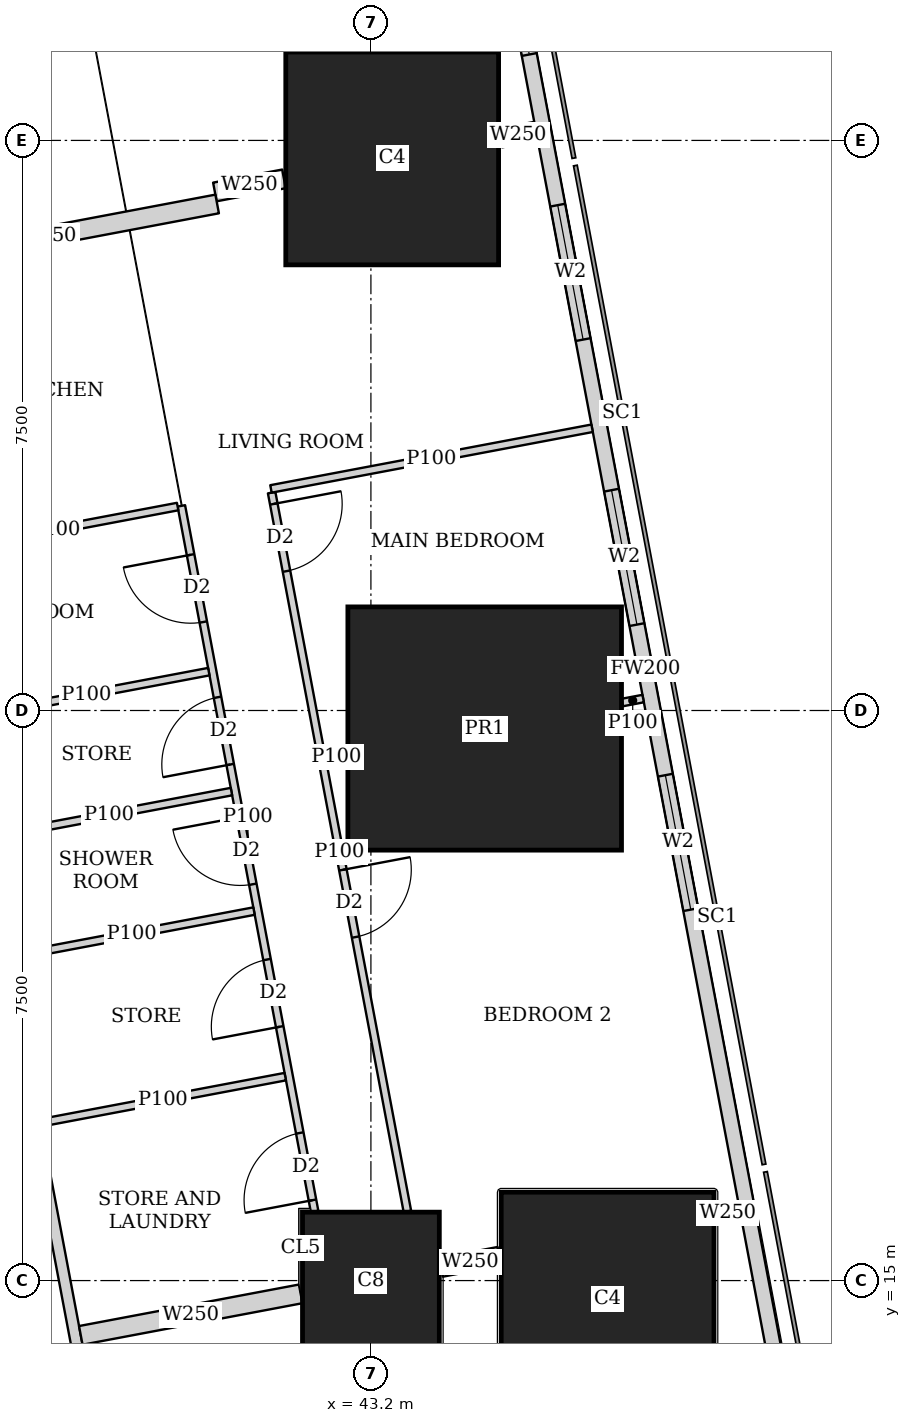
"""IFC4 building model, lengths in metres.
Left out: names, types, materials, properties, quantities, classifications, styles, units other than length and angle.
Written with IfcOpenShell. Run it as: python <this file> out.ifc"""

import sys

from ifc_helpers import new_model, si_unit, direction, frame, frame_2d, origin, origin_2d, place, context, subcontext, project, spatial, rectangle, extrude, element, fill, save


model = new_model("IFC4")
c1 = context("Model", 3, precision=1e-05, world=origin(), true_north=direction((0.0, 1.0)))
c2 = subcontext(c1, "Body", "Model", "MODEL_VIEW")
j1 = project(units=[si_unit("LENGTHUNIT", "METRE"), si_unit("PLANEANGLEUNIT", "RADIAN")], contexts=[c1])
p1 = place(None, origin())
s1 = spatial("IfcSite", under=j1, at=p1, CompositionType="ELEMENT")
p2 = place(p1, origin())
s2 = spatial("IfcBuilding", under=s1, at=p2, CompositionType="ELEMENT")
p3 = place(p2, frame((0.0, 0.0, 31.25)))
s3 = spatial("IfcBuildingStorey", under=s2, at=p3, CompositionType="ELEMENT", Elevation=31.25)
p4 = place(p3, frame((43.2, 15.0, 0.0), z_axis=(0.0, 0.0, 1.0), x_axis=(1.0, 0.0, 0.0)))
e1 = element("IfcColumn", 1, at=p4, inside=s3, PredefinedType="COLUMN", context=c2, shape_type="SweptSolid", body=[
    extrude(rectangle(XDim=1.8, YDim=1.8, at=origin_2d()), origin(), (0.0, 0.0, 1.0), 3.75),
])
p5 = place(p3, frame((46.314, 14.763, 0.0), z_axis=(0.0, 0.0, 1.0), x_axis=(1.0, 0.0, 0.0)))
e2 = element("IfcColumn", 2, at=p5, inside=s3, PredefinedType="COLUMN", context=c2, shape_type="SweptSolid", body=[
    extrude(rectangle(XDim=2.8, YDim=2.8, at=origin_2d()), origin(), (0.0, 0.0, 1.0), 3.75),
])
p6 = place(p3, frame((44.697, 22.263, 0.0), z_axis=(0.0, 0.0, 1.0), x_axis=(1.0, 0.0, 0.0)))
e3 = element("IfcColumn", 3, at=p6, inside=s3, PredefinedType="COLUMN", context=c2, shape_type="SweptSolid", body=[
    extrude(rectangle(XDim=3.6, YDim=3.2, at=origin_2d()), origin(), (0.0, 0.0, 1.0), 3.75),
])
p7 = place(p3, frame((43.48, 29.763, 0.0), z_axis=(0.0, 0.0, 1.0), x_axis=(1.0, 0.0, 0.0)))
e4 = element("IfcColumn", 4, at=p7, inside=s3, PredefinedType="COLUMN", context=c2, shape_type="SweptSolid", body=[
    extrude(rectangle(XDim=2.8, YDim=2.8, at=origin_2d()), origin(), (0.0, 0.0, 1.0), 3.75),
])
p8 = place(p3, frame((50.653, 2.703, 0.0), z_axis=(0.0, 0.0, 1.0), x_axis=(-0.185612026696, 0.982623109613, 0.0)))
e5 = element("IfcWall", 5, at=p8, inside=s3, PredefinedType="SOLIDWALL", context=c2, shape_type="SweptSolid", body=[
    extrude(rectangle(XDim=41.393, YDim=0.2, at=frame_2d((20.697, 0.0))), origin(), (0.0, 0.0, 1.0), 3.5),
])
p9 = place(p8, frame((1.633, 0.0, 0.9)))
e6 = element("IfcOpeningElement", 6, at=p9, cuts=e5, PredefinedType="OPENING", context=c2, shape_type="SweptSolid", body=[
    extrude(rectangle(XDim=1.8, YDim=1.5, at=frame_2d((0.9, 0.75))), frame((0.0, 0.11, 0.0), z_axis=(0.0, -1.0, 0.0), x_axis=(1.0, 0.0, 0.0)), (0.0, 0.0, 1.0), 0.22),
])
p10 = place(p8, frame((6.032, 0.0, 0.9)))
e7 = element("IfcOpeningElement", 7, at=p10, cuts=e5, PredefinedType="OPENING", context=c2, shape_type="SweptSolid", body=[
    extrude(rectangle(XDim=1.8, YDim=1.5, at=frame_2d((0.9, 0.75))), frame((0.0, 0.11, 0.0), z_axis=(0.0, -1.0, 0.0), x_axis=(1.0, 0.0, 0.0)), (0.0, 0.0, 1.0), 0.22),
])
p11 = place(p8, frame((9.848, 0.0, 0.9)))
e8 = element("IfcOpeningElement", 8, at=p11, cuts=e5, PredefinedType="OPENING", context=c2, shape_type="SweptSolid", body=[
    extrude(rectangle(XDim=1.8, YDim=1.5, at=frame_2d((0.9, 0.75))), frame((0.0, 0.11, 0.0), z_axis=(0.0, -1.0, 0.0), x_axis=(1.0, 0.0, 0.0)), (0.0, 0.0, 1.0), 0.22),
])
p12 = place(p8, frame((17.481, 0.0, 0.9)))
e9 = element("IfcOpeningElement", 9, at=p12, cuts=e5, PredefinedType="OPENING", context=c2, shape_type="SweptSolid", body=[
    extrude(rectangle(XDim=1.8, YDim=1.5, at=frame_2d((0.9, 0.75))), frame((0.0, 0.11, 0.0), z_axis=(0.0, -1.0, 0.0), x_axis=(1.0, 0.0, 0.0)), (0.0, 0.0, 1.0), 0.22),
])
p13 = place(p8, frame((21.297, 0.0, 0.9)))
e10 = element("IfcOpeningElement", 10, at=p13, cuts=e5, PredefinedType="OPENING", context=c2, shape_type="SweptSolid", body=[
    extrude(rectangle(XDim=1.8, YDim=1.5, at=frame_2d((0.9, 0.75))), frame((0.0, 0.11, 0.0), z_axis=(0.0, -1.0, 0.0), x_axis=(1.0, 0.0, 0.0)), (0.0, 0.0, 1.0), 0.22),
])
p14 = place(p8, frame((25.113, 0.0, 0.9)))
e11 = element("IfcOpeningElement", 11, at=p14, cuts=e5, PredefinedType="OPENING", context=c2, shape_type="SweptSolid", body=[
    extrude(rectangle(XDim=1.8, YDim=1.5, at=frame_2d((0.9, 0.75))), frame((0.0, 0.11, 0.0), z_axis=(0.0, -1.0, 0.0), x_axis=(1.0, 0.0, 0.0)), (0.0, 0.0, 1.0), 0.22),
])
p15 = place(p8, frame((28.93, 0.0, 0.9)))
e12 = element("IfcOpeningElement", 12, at=p15, cuts=e5, PredefinedType="OPENING", context=c2, shape_type="SweptSolid", body=[
    extrude(rectangle(XDim=1.8, YDim=1.5, at=frame_2d((0.9, 0.75))), frame((0.0, 0.11, 0.0), z_axis=(0.0, -1.0, 0.0), x_axis=(1.0, 0.0, 0.0)), (0.0, 0.0, 1.0), 0.22),
])
p16 = place(p8, frame((32.746, 0.0, 0.9)))
e13 = element("IfcOpeningElement", 13, at=p16, cuts=e5, PredefinedType="OPENING", context=c2, shape_type="SweptSolid", body=[
    extrude(rectangle(XDim=1.8, YDim=1.5, at=frame_2d((0.9, 0.75))), frame((0.0, 0.11, 0.0), z_axis=(0.0, -1.0, 0.0), x_axis=(1.0, 0.0, 0.0)), (0.0, 0.0, 1.0), 0.22),
])
p17 = place(p8, frame((36.481, 0.0, 0.9)))
e14 = element("IfcOpeningElement", 14, at=p17, cuts=e5, PredefinedType="OPENING", context=c2, shape_type="SweptSolid", body=[
    extrude(rectangle(XDim=1.8, YDim=1.5, at=frame_2d((0.9, 0.75))), frame((0.0, 0.11, 0.0), z_axis=(0.0, -1.0, 0.0), x_axis=(1.0, 0.0, 0.0)), (0.0, 0.0, 1.0), 0.22),
])
p18 = place(p3, frame((35.094, 36.585, 0.0), z_axis=(0.0, 0.0, 1.0), x_axis=(0.185588860311, -0.982627485331, 0.0)))
e15 = element("IfcWall", 15, at=p18, inside=s3, PredefinedType="SOLIDWALL", context=c2, shape_type="SweptSolid", body=[
    extrude(rectangle(XDim=34.797, YDim=0.15, at=frame_2d((17.399, 0.0))), origin(), (0.0, 0.0, 1.0), 2.5),
])
p19 = place(p18, frame((6.012, 0.0, 0.0)))
e16 = element("IfcOpeningElement", 16, at=p19, cuts=e15, PredefinedType="OPENING", context=c2, shape_type="SweptSolid", body=[
    extrude(rectangle(XDim=1.0, YDim=2.1, at=frame_2d((0.5, 1.05))), frame((0.0, 0.085, 0.0), z_axis=(0.0, -1.0, 0.0), x_axis=(1.0, 0.0, 0.0)), (0.0, 0.0, 1.0), 0.17),
])
p20 = place(p18, frame((9.828, 0.0, 0.0)))
e17 = element("IfcOpeningElement", 17, at=p20, cuts=e15, PredefinedType="OPENING", context=c2, shape_type="SweptSolid", body=[
    extrude(rectangle(XDim=1.0, YDim=2.1, at=frame_2d((0.5, 1.05))), frame((0.0, 0.085, 0.0), z_axis=(0.0, -1.0, 0.0), x_axis=(1.0, 0.0, 0.0)), (0.0, 0.0, 1.0), 0.17),
])
p21 = place(p18, frame((25.9, 0.0, 0.0)))
e18 = element("IfcOpeningElement", 18, at=p21, cuts=e15, PredefinedType="OPENING", context=c2, shape_type="SweptSolid", body=[
    extrude(rectangle(XDim=1.0, YDim=2.1, at=frame_2d((0.5, 1.05))), frame((0.0, 0.085, 0.0), z_axis=(0.0, -1.0, 0.0), x_axis=(1.0, 0.0, 0.0)), (0.0, 0.0, 1.0), 0.17),
])
p22 = place(p3, frame((41.894, 25.366, 0.0), z_axis=(0.0, 0.0, 1.0), x_axis=(0.185581190027, -0.982628933987, 0.0)))
e19 = element("IfcWall", 19, at=p22, inside=s3, PredefinedType="PARTITIONING", context=c2, shape_type="SweptSolid", body=[
    extrude(rectangle(XDim=9.623, YDim=0.1, at=frame_2d((4.812, 0.0))), origin(), (0.0, 0.0, 1.0), 2.5),
])
p23 = place(p22, frame((0.151, 0.0, 0.0)))
e20 = element("IfcOpeningElement", 20, at=p23, cuts=e19, PredefinedType="OPENING", context=c2, shape_type="SweptSolid", body=[
    extrude(rectangle(XDim=0.9, YDim=2.1, at=frame_2d((0.45, 1.05))), frame((0.0, 0.06, 0.0), z_axis=(0.0, -1.0, 0.0), x_axis=(1.0, 0.0, 0.0)), (0.0, 0.0, 1.0), 0.12),
])
p24 = place(p22, frame((5.05, 0.0, 0.0)))
e21 = element("IfcOpeningElement", 21, at=p24, cuts=e19, PredefinedType="OPENING", context=c2, shape_type="SweptSolid", body=[
    extrude(rectangle(XDim=0.9, YDim=2.1, at=frame_2d((0.45, 1.05))), frame((0.0, 0.06, 0.0), z_axis=(0.0, -1.0, 0.0), x_axis=(1.0, 0.0, 0.0)), (0.0, 0.0, 1.0), 0.12),
])
p25 = place(p3, frame((40.706, 25.192, 0.0), z_axis=(0.0, 0.0, 1.0), x_axis=(0.185572668944, -0.982630543257, 0.0)))
e22 = element("IfcWall", 22, at=p25, inside=s3, PredefinedType="PARTITIONING", context=c2, shape_type="SweptSolid", body=[
    extrude(rectangle(XDim=9.446, YDim=0.1, at=frame_2d((4.723, 0.0))), origin(), (0.0, 0.0, 1.0), 2.5),
])
p26 = place(p25, frame((0.655, 0.0, 0.0)))
e23 = element("IfcOpeningElement", 23, at=p26, cuts=e22, PredefinedType="OPENING", context=c2, shape_type="SweptSolid", body=[
    extrude(rectangle(XDim=0.9, YDim=2.1, at=frame_2d((0.45, 1.05))), frame((0.0, 0.06, 0.0), z_axis=(0.0, -1.0, 0.0), x_axis=(1.0, 0.0, 0.0)), (0.0, 0.0, 1.0), 0.12),
])
p27 = place(p25, frame((4.166, 0.0, 0.0)))
e24 = element("IfcOpeningElement", 24, at=p27, cuts=e22, PredefinedType="OPENING", context=c2, shape_type="SweptSolid", body=[
    extrude(rectangle(XDim=0.9, YDim=2.1, at=frame_2d((0.45, 1.05))), frame((0.0, 0.06, 0.0), z_axis=(0.0, -1.0, 0.0), x_axis=(1.0, 0.0, 0.0)), (0.0, 0.0, 1.0), 0.12),
])
p28 = place(p25, frame((8.396, 0.0, 0.0)))
e25 = element("IfcOpeningElement", 25, at=p28, cuts=e22, PredefinedType="OPENING", context=c2, shape_type="SweptSolid", body=[
    extrude(rectangle(XDim=0.9, YDim=2.1, at=frame_2d((0.45, 1.05))), frame((0.0, 0.06, 0.0), z_axis=(0.0, -1.0, 0.0), x_axis=(1.0, 0.0, 0.0)), (0.0, 0.0, 1.0), 0.12),
])
p29 = place(p25, frame((2.563, 0.0, 0.0)))
e26 = element("IfcOpeningElement", 26, at=p29, cuts=e22, PredefinedType="OPENING", context=c2, shape_type="SweptSolid", body=[
    extrude(rectangle(XDim=0.9, YDim=2.1, at=frame_2d((0.45, 1.05))), frame((0.0, 0.06, 0.0), z_axis=(0.0, -1.0, 0.0), x_axis=(1.0, 0.0, 0.0)), (0.0, 0.0, 1.0), 0.12),
])
p30 = place(p25, frame((6.074, 0.0, 0.0)))
e27 = element("IfcOpeningElement", 27, at=p30, cuts=e22, PredefinedType="OPENING", context=c2, shape_type="SweptSolid", body=[
    extrude(rectangle(XDim=0.9, YDim=2.1, at=frame_2d((0.45, 1.05))), frame((0.0, 0.06, 0.0), z_axis=(0.0, -1.0, 0.0), x_axis=(1.0, 0.0, 0.0)), (0.0, 0.0, 1.0), 0.12),
])
p31 = place(p3, frame((46.11, 26.213, 0.0), z_axis=(0.0, 0.0, 1.0), x_axis=(-0.982633535512, -0.185556823879, 0.0)))
e28 = element("IfcWall", 28, at=p31, inside=s3, PredefinedType="PARTITIONING", context=c2, shape_type="SweptSolid", body=[
    extrude(rectangle(XDim=4.3, YDim=0.1, at=frame_2d((2.15, 0.0))), origin(), (0.0, 0.0, 1.0), 2.05),
])
p32 = place(p3, frame((46.782, 22.657, 0.0), z_axis=(0.0, 0.0, 1.0), x_axis=(-0.982574553168, -0.185868898601, 0.0)))
e29 = element("IfcWall", 29, at=p32, inside=s3, PredefinedType="PARTITIONING", context=c2, shape_type="SweptSolid", body=[
    extrude(rectangle(XDim=0.28, YDim=0.1, at=frame_2d((0.14, 0.0))), origin(), (0.0, 0.0, 1.0), 3.5),
])
p33 = place(p3, frame((42.887, 21.921, 0.0), z_axis=(0.0, 0.0, 1.0), x_axis=(-0.982688058078, -0.185267861514, 0.0)))
e30 = element("IfcWall", 30, at=p33, inside=s3, PredefinedType="PARTITIONING", context=c2, shape_type="SweptSolid", body=[
    extrude(rectangle(XDim=0.286, YDim=0.1, at=frame_2d((0.143, 0.0))), origin(), (0.0, 0.0, 1.0), 2.5),
])
for number, where, z_axis, x_axis in (
    (31, (40.657, 25.183, 0.0), (0.0, 0.0, 1.0), (-0.983, -0.186, 0.0)),
    (32, (41.365, 21.433, 0.0), (0.0, 0.0, 1.0), (-0.983, -0.186, 0.0)),
    (33, (42.073, 17.683, 0.0), (0.0, 0.0, 1.0), (-0.983, -0.186, 0.0)),
):
    element("IfcWall", number, at=place(p3, frame(where, z_axis=z_axis, x_axis=x_axis)), inside=s3, PredefinedType="PARTITIONING", context=c2, shape_type="SweptSolid", body=[
        extrude(rectangle(XDim=3.275, YDim=0.1, at=frame_2d((1.637, 0.0))), origin(), (0.0, 0.0, 1.0), 3.5),
    ])
p34 = place(p3, frame((41.067, 23.011, 0.0), z_axis=(0.0, 0.0, 1.0), x_axis=(-0.982618057925, -0.185638768151, 0.0)))
e34 = element("IfcWall", 34, at=p34, inside=s3, PredefinedType="PARTITIONING", context=c2, shape_type="SweptSolid", body=[
    extrude(rectangle(XDim=3.275, YDim=0.1, at=frame_2d((1.637, 0.0))), origin(), (0.0, 0.0, 1.0), 2.5),
])
p35 = place(p3, frame((41.662, 19.861, 0.0), z_axis=(0.0, 0.0, 1.0), x_axis=(-0.982607026909, -0.185697147715, 0.0)))
e35 = element("IfcWall", 35, at=p35, inside=s3, PredefinedType="PARTITIONING", context=c2, shape_type="SweptSolid", body=[
    extrude(rectangle(XDim=3.275, YDim=0.1, at=frame_2d((1.637, 0.0))), origin(), (0.0, 0.0, 1.0), 3.5),
])
p36 = place(p3, frame((45.372, 30.121, 0.0), z_axis=(0.0, 0.0, 1.0), x_axis=(-0.982352019699, -0.187041464366, 0.0)))
e36 = element("IfcWall", 36, at=p36, inside=s3, PredefinedType="SOLIDWALL", context=c2, shape_type="SweptSolid", body=[
    extrude(rectangle(XDim=0.476, YDim=0.25, at=frame_2d((0.238, 0.0))), origin(), (0.0, 0.0, 1.0), 3.5),
])
p37 = place(p3, frame((42.056, 29.494, 0.0), z_axis=(0.0, 0.0, 1.0), x_axis=(-0.982587178881, -0.185802141803, 0.0)))
e37 = element("IfcWall", 37, at=p37, inside=s3, PredefinedType="SOLIDWALL", context=c2, shape_type="SweptSolid", body=[
    extrude(rectangle(XDim=0.925, YDim=0.25, at=frame_2d((0.462, 0.0))), origin(), (0.0, 0.0, 1.0), 2.5),
])
p38 = place(p3, frame((41.177, 29.164, 0.0), z_axis=(0.0, 0.0, 1.0), x_axis=(-0.982612837616, -0.185666398014, 0.0)))
e38 = element("IfcWall", 38, at=p38, inside=s3, PredefinedType="SOLIDWALL", context=c2, shape_type="SweptSolid", body=[
    extrude(rectangle(XDim=4.525, YDim=0.25, at=frame_2d((2.262, 0.0))), origin(), (0.0, 0.0, 1.0), 2.5),
])
p39 = place(p3, frame((48.055, 15.917, 0.0), z_axis=(0.0, 0.0, 1.0), x_axis=(-0.982510408223, -0.186207673669, 0.0)))
e39 = element("IfcWall", 39, at=p39, inside=s3, PredefinedType="SOLIDWALL", context=c2, shape_type="SweptSolid", body=[
    extrude(rectangle(XDim=0.323, YDim=0.25, at=frame_2d((0.161, 0.0))), origin(), (0.0, 0.0, 1.0), 3.5),
])
p40 = place(p3, frame((44.89, 15.319, 0.0), z_axis=(0.0, 0.0, 1.0), x_axis=(-0.982540856152, -0.186046945666, 0.0)))
e40 = element("IfcWall", 40, at=p40, inside=s3, PredefinedType="SOLIDWALL", context=c2, shape_type="SweptSolid", body=[
    extrude(rectangle(XDim=0.78, YDim=0.25, at=frame_2d((0.39, 0.0))), origin(), (0.0, 0.0, 1.0), 2.05),
])
p41 = place(p3, frame((42.276, 14.825, 0.0), z_axis=(0.0, 0.0, 1.0), x_axis=(-0.982656521819, -0.185435056358, 0.0)))
e41 = element("IfcWall", 41, at=p41, inside=s3, PredefinedType="SOLIDWALL", context=c2, shape_type="SweptSolid", body=[
    extrude(rectangle(XDim=2.944, YDim=0.25, at=frame_2d((1.472, 0.0))), origin(), (0.0, 0.0, 1.0), 3.5),
])
p42 = place(p12, origin())
e42 = element("IfcWindow", 42, at=p42, inside=s3, PartitioningType="SINGLE_PANEL", PredefinedType="WINDOW", context=c2, shape_type="SweptSolid", body=[
    extrude(rectangle(XDim=1.8, YDim=1.5, at=frame_2d((0.9, 0.75))), frame((0.0, 0.03, 0.0), z_axis=(0.0, -1.0, 0.0), x_axis=(1.0, 0.0, 0.0)), (0.0, 0.0, 1.0), 0.06),
])
fill(e9, e42)
p43 = place(p13, origin())
e43 = element("IfcWindow", 43, at=p43, inside=s3, PartitioningType="SINGLE_PANEL", PredefinedType="WINDOW", context=c2, shape_type="SweptSolid", body=[
    extrude(rectangle(XDim=1.8, YDim=1.5, at=frame_2d((0.9, 0.75))), frame((0.0, 0.03, 0.0), z_axis=(0.0, -1.0, 0.0), x_axis=(1.0, 0.0, 0.0)), (0.0, 0.0, 1.0), 0.06),
])
fill(e10, e43)
p44 = place(p14, origin())
e44 = element("IfcWindow", 44, at=p44, inside=s3, PartitioningType="SINGLE_PANEL", PredefinedType="WINDOW", context=c2, shape_type="SweptSolid", body=[
    extrude(rectangle(XDim=1.8, YDim=1.5, at=frame_2d((0.9, 0.75))), frame((0.0, 0.03, 0.0), z_axis=(0.0, -1.0, 0.0), x_axis=(1.0, 0.0, 0.0)), (0.0, 0.0, 1.0), 0.06),
])
fill(e11, e44)
p45 = place(p15, origin())
e45 = element("IfcWindow", 45, at=p45, inside=s3, PartitioningType="SINGLE_PANEL", PredefinedType="WINDOW", context=c2, shape_type="SweptSolid", body=[
    extrude(rectangle(XDim=1.8, YDim=1.5, at=frame_2d((0.9, 0.75))), frame((0.0, 0.03, 0.0), z_axis=(0.0, -1.0, 0.0), x_axis=(1.0, 0.0, 0.0)), (0.0, 0.0, 1.0), 0.06),
])
fill(e12, e45)
p46 = place(p23, origin())
e46 = element("IfcDoor", 46, at=p46, inside=s3, OperationType="SINGLE_SWING_LEFT", PredefinedType="DOOR", context=c2, shape_type="SweptSolid", body=[
    extrude(rectangle(XDim=0.9, YDim=2.1, at=frame_2d((0.45, 1.05))), frame((0.0, 0.025, 0.0), z_axis=(0.0, -1.0, 0.0), x_axis=(1.0, 0.0, 0.0)), (0.0, 0.0, 1.0), 0.05),
])
fill(e20, e46)
p47 = place(p24, origin())
e47 = element("IfcDoor", 47, at=p47, inside=s3, OperationType="SINGLE_SWING_LEFT", PredefinedType="DOOR", context=c2, shape_type="SweptSolid", body=[
    extrude(rectangle(XDim=0.9, YDim=2.1, at=frame_2d((0.45, 1.05))), frame((0.0, 0.025, 0.0), z_axis=(0.0, -1.0, 0.0), x_axis=(1.0, 0.0, 0.0)), (0.0, 0.0, 1.0), 0.05),
])
fill(e21, e47)
p48 = place(p26, origin())
e48 = element("IfcDoor", 48, at=p48, inside=s3, OperationType="SINGLE_SWING_RIGHT", PredefinedType="DOOR", context=c2, shape_type="SweptSolid", body=[
    extrude(rectangle(XDim=0.9, YDim=2.1, at=frame_2d((0.45, 1.05))), frame((0.0, 0.025, 0.0), z_axis=(0.0, -1.0, 0.0), x_axis=(1.0, 0.0, 0.0)), (0.0, 0.0, 1.0), 0.05),
])
fill(e23, e48)
p49 = place(p27, origin())
e49 = element("IfcDoor", 49, at=p49, inside=s3, OperationType="SINGLE_SWING_RIGHT", PredefinedType="DOOR", context=c2, shape_type="SweptSolid", body=[
    extrude(rectangle(XDim=0.9, YDim=2.1, at=frame_2d((0.45, 1.05))), frame((0.0, 0.025, 0.0), z_axis=(0.0, -1.0, 0.0), x_axis=(1.0, 0.0, 0.0)), (0.0, 0.0, 1.0), 0.05),
])
fill(e24, e49)
p50 = place(p28, origin())
e50 = element("IfcDoor", 50, at=p50, inside=s3, OperationType="SINGLE_SWING_LEFT", PredefinedType="DOOR", context=c2, shape_type="SweptSolid", body=[
    extrude(rectangle(XDim=0.9, YDim=2.1, at=frame_2d((0.45, 1.05))), frame((0.0, 0.025, 0.0), z_axis=(0.0, -1.0, 0.0), x_axis=(1.0, 0.0, 0.0)), (0.0, 0.0, 1.0), 0.05),
])
fill(e25, e50)
p51 = place(p29, origin())
e51 = element("IfcDoor", 51, at=p51, inside=s3, OperationType="SINGLE_SWING_LEFT", PredefinedType="DOOR", context=c2, shape_type="SweptSolid", body=[
    extrude(rectangle(XDim=0.9, YDim=2.1, at=frame_2d((0.45, 1.05))), frame((0.0, 0.025, 0.0), z_axis=(0.0, -1.0, 0.0), x_axis=(1.0, 0.0, 0.0)), (0.0, 0.0, 1.0), 0.05),
])
fill(e26, e51)
p52 = place(p30, origin())
e52 = element("IfcDoor", 52, at=p52, inside=s3, OperationType="SINGLE_SWING_LEFT", PredefinedType="DOOR", context=c2, shape_type="SweptSolid", body=[
    extrude(rectangle(XDim=0.9, YDim=2.1, at=frame_2d((0.45, 1.05))), frame((0.0, 0.025, 0.0), z_axis=(0.0, -1.0, 0.0), x_axis=(1.0, 0.0, 0.0)), (0.0, 0.0, 1.0), 0.05),
])
fill(e27, e52)
save(model, sys.argv[1])
